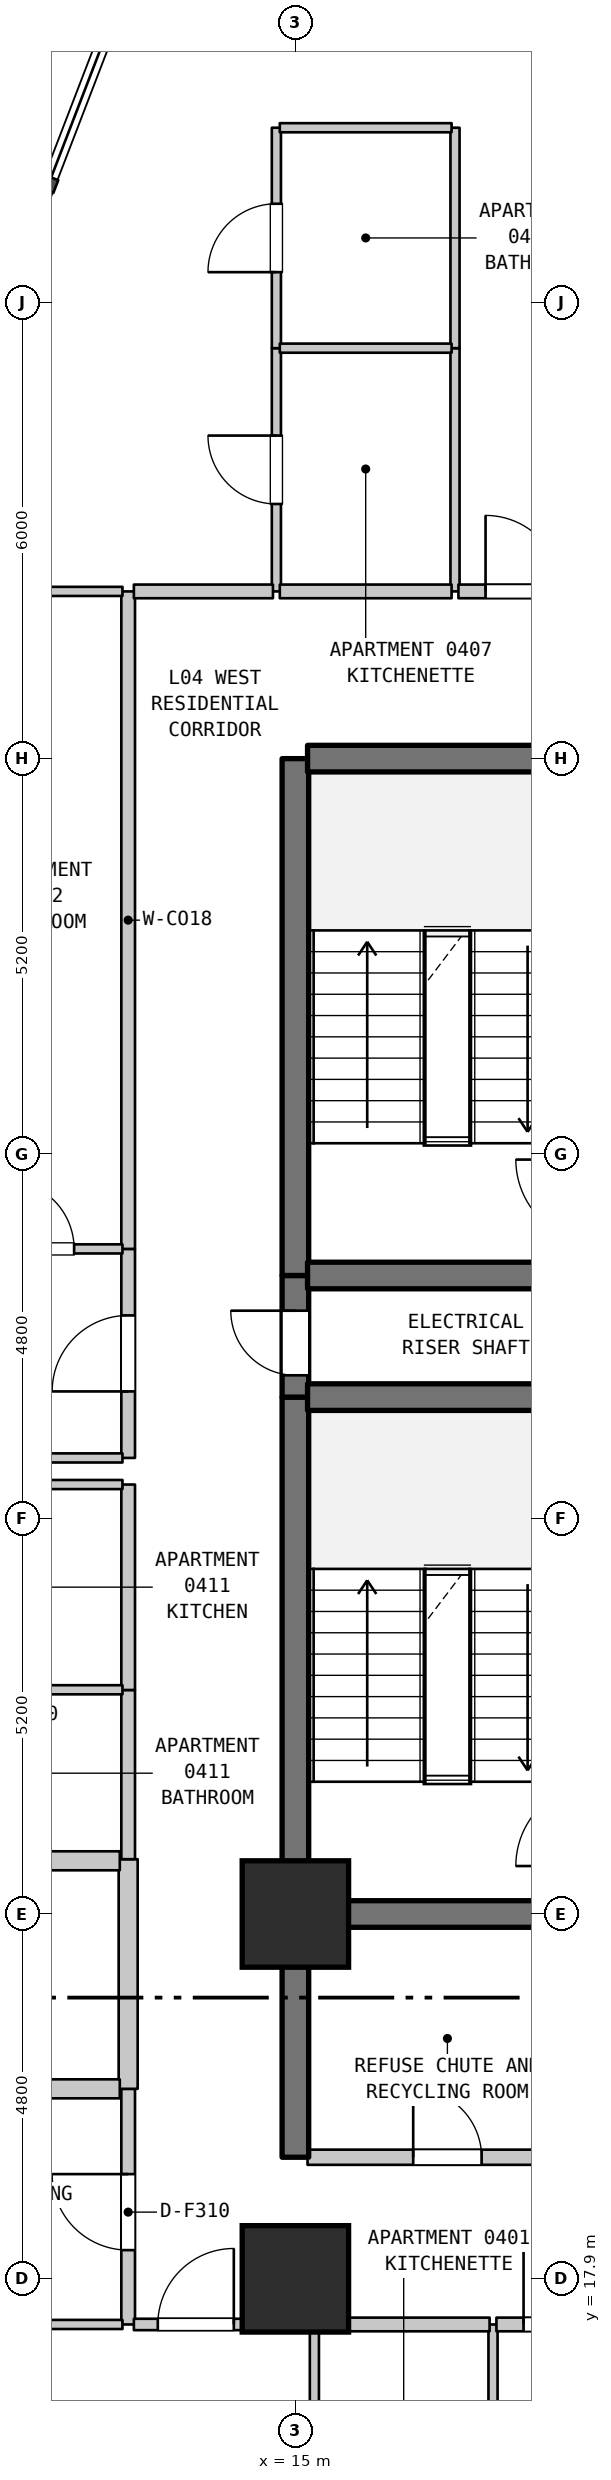
"""IFC4 building model, lengths in metres.
Left out: names, types, materials, properties, quantities, classifications, styles, units other than length and angle.
Written with IfcOpenShell. Run it as: python <this file> out.ifc"""

import sys

from ifc_helpers import new_model, si_unit, direction, frame, frame_2d, origin, origin_2d, place, context, subcontext, project, spatial, rectangle, extrude, element, fill, save


model = new_model("IFC4")
c1 = context("Model", 3, precision=1e-05, world=origin(), true_north=direction((0.0, 1.0)))
c2 = subcontext(c1, "Body", "Model", "MODEL_VIEW")
j1 = project(units=[si_unit("LENGTHUNIT", "METRE"), si_unit("PLANEANGLEUNIT", "RADIAN")], contexts=[c1])
p1 = place(None, origin())
s1 = spatial("IfcSite", under=j1, at=p1, CompositionType="ELEMENT")
p2 = place(p1, origin())
s2 = spatial("IfcBuilding", under=s1, at=p2, CompositionType="ELEMENT")
p3 = place(p2, frame((0.0, 0.0, 24.0)))
s3 = spatial("IfcBuildingStorey", under=s2, at=p3, CompositionType="ELEMENT", Elevation=24.0)
for number, where, z_axis, x_axis in (
    (1, (15.0, 17.9, 0.0), (0.0, 0.0, 1.0), (1.0, 0.0, 0.0)),
    (2, (15.0, 22.7, 0.0), (0.0, 0.0, 1.0), (1.0, 0.0, 0.0)),
):
    element("IfcColumn", number, at=place(p3, frame(where, z_axis=z_axis, x_axis=x_axis)), inside=s3, PredefinedType="COLUMN", context=c2, shape_type="SweptSolid", body=[
        extrude(rectangle(XDim=1.4, YDim=1.4, at=origin_2d()), origin(), (0.0, 0.0, 1.0), 3.7),
    ])
p4 = place(p3, frame((12.8, 17.3, 0.0), z_axis=(0.0, 0.0, 1.0), x_axis=(0.0, 1.0, 0.0)))
e3 = element("IfcWall", 3, at=p4, inside=s3, PredefinedType="STANDARD", context=c2, shape_type="SweptSolid", body=[
    extrude(rectangle(XDim=3.1, YDim=0.18, at=frame_2d((1.55, 0.0))), origin(), (0.0, 0.0, 1.0), 3.385),
])
p5 = place(p4, frame((0.978, 0.0, 0.0)))
e4 = element("IfcOpeningElement", 4, at=p5, cuts=e3, PredefinedType="OPENING", context=c2, shape_type="SweptSolid", body=[
    extrude(rectangle(XDim=1.0, YDim=2.15, at=frame_2d((0.5, 1.075))), frame((0.0, 0.1, 0.0), z_axis=(0.0, -1.0, 0.0), x_axis=(1.0, 0.0, 0.0)), (0.0, 0.0, 1.0), 0.2),
])
p6 = place(p3, frame((12.8, 20.4, 0.0), z_axis=(0.0, 0.0, 1.0), x_axis=(0.0, 1.0, 0.0)))
e5 = element("IfcWall", 5, at=p6, inside=s3, PredefinedType="STANDARD", context=c2, shape_type="SweptSolid", body=[
    extrude(rectangle(XDim=3.021, YDim=0.25, at=frame_2d((1.51, 0.0))), origin(), (0.0, 0.0, 1.0), 3.385),
])
p7 = place(p3, frame((12.8, 23.421, 0.0), z_axis=(0.0, 0.0, 1.0), x_axis=(0.0, 1.0, 0.0)))
e6 = element("IfcWall", 6, at=p7, inside=s3, PredefinedType="STANDARD", context=c2, shape_type="SweptSolid", body=[
    extrude(rectangle(XDim=2.226, YDim=0.18, at=frame_2d((1.113, 0.0))), origin(), (0.0, 0.0, 1.0), 3.385),
])
p8 = place(p3, frame((12.8, 25.647, 0.0), z_axis=(0.0, 0.0, 1.0), x_axis=(0.0, 1.0, 0.0)))
e7 = element("IfcWall", 7, at=p8, inside=s3, PredefinedType="STANDARD", context=c2, shape_type="SweptSolid", body=[
    extrude(rectangle(XDim=2.703, YDim=0.18, at=frame_2d((1.352, 0.0))), origin(), (0.0, 0.0, 1.0), 3.385),
])
p9 = place(p3, frame((12.8, 28.7, 0.0), z_axis=(0.0, 0.0, 1.0), x_axis=(0.0, 1.0, 0.0)))
e8 = element("IfcWall", 8, at=p9, inside=s3, PredefinedType="STANDARD", context=c2, shape_type="SweptSolid", body=[
    extrude(rectangle(XDim=2.75, YDim=0.18, at=frame_2d((1.375, 0.0))), origin(), (0.0, 0.0, 1.0), 3.385),
])
p10 = place(p9, frame((0.875, 0.0, 0.0)))
e9 = element("IfcOpeningElement", 9, at=p10, cuts=e8, PredefinedType="OPENING", context=c2, shape_type="SweptSolid", body=[
    extrude(rectangle(XDim=1.0, YDim=2.15, at=frame_2d((0.5, 1.075))), frame((0.0, 0.1, 0.0), z_axis=(0.0, -1.0, 0.0), x_axis=(1.0, 0.0, 0.0)), (0.0, 0.0, 1.0), 0.2),
])
p11 = place(p3, frame((12.8, 31.45, 0.0), z_axis=(0.0, 0.0, 1.0), x_axis=(0.0, 1.0, 0.0)))
e10 = element("IfcWall", 10, at=p11, inside=s3, PredefinedType="STANDARD", context=c2, shape_type="SweptSolid", body=[
    extrude(rectangle(XDim=8.65, YDim=0.18, at=frame_2d((4.325, 0.0))), origin(), (0.0, 0.0, 1.0), 3.385),
])
p12 = place(p3, frame((14.75, 40.1, 0.0), z_axis=(0.0, 0.0, 1.0), x_axis=(0.0, 1.0, 0.0)))
e11 = element("IfcWall", 11, at=p12, inside=s3, PredefinedType="PARTITIONING", context=c2, shape_type="SweptSolid", body=[
    extrude(rectangle(XDim=3.2, YDim=0.12, at=frame_2d((1.6, 0.0))), origin(), (0.0, 0.0, 1.0), 3.385),
])
p13 = place(p12, frame((1.15, 0.0, 0.0)))
e12 = element("IfcOpeningElement", 12, at=p13, cuts=e11, PredefinedType="OPENING", context=c2, shape_type="SweptSolid", body=[
    extrude(rectangle(XDim=0.9, YDim=2.15, at=frame_2d((0.45, 1.075))), frame((0.0, 0.07, 0.0), z_axis=(0.0, -1.0, 0.0), x_axis=(1.0, 0.0, 0.0)), (0.0, 0.0, 1.0), 0.14),
])
p14 = place(p3, frame((14.75, 43.3, 0.0), z_axis=(0.0, 0.0, 1.0), x_axis=(0.0, 1.0, 0.0)))
e13 = element("IfcWall", 13, at=p14, inside=s3, PredefinedType="PARTITIONING", context=c2, shape_type="SweptSolid", body=[
    extrude(rectangle(XDim=2.9, YDim=0.12, at=frame_2d((1.45, 0.0))), origin(), (0.0, 0.0, 1.0), 3.385),
])
p15 = place(p14, frame((1.0, 0.0, 0.0)))
e14 = element("IfcOpeningElement", 14, at=p15, cuts=e13, PredefinedType="OPENING", context=c2, shape_type="SweptSolid", body=[
    extrude(rectangle(XDim=0.9, YDim=2.1, at=frame_2d((0.45, 1.05))), frame((0.0, 0.07, 0.0), z_axis=(0.0, -1.0, 0.0), x_axis=(1.0, 0.0, 0.0)), (0.0, 0.0, 1.0), 0.14),
])
p16 = place(p3, frame((15.0, 19.5, 0.0), z_axis=(0.0, 0.0, 1.0), x_axis=(0.0, 1.0, 0.0)))
e15 = element("IfcWall", 15, at=p16, inside=s3, PredefinedType="SHEAR", context=c2, shape_type="SweptSolid", body=[
    extrude(rectangle(XDim=3.2, YDim=0.35, at=frame_2d((1.6, 0.0))), origin(), (0.0, 0.0, 1.0), 3.385),
])
p17 = place(p3, frame((15.0, 22.7, 0.0), z_axis=(0.0, 0.0, 1.0), x_axis=(0.0, 1.0, 0.0)))
e16 = element("IfcWall", 16, at=p17, inside=s3, PredefinedType="SHEAR", context=c2, shape_type="SweptSolid", body=[
    extrude(rectangle(XDim=6.8, YDim=0.35, at=frame_2d((3.4, 0.0))), origin(), (0.0, 0.0, 1.0), 3.385),
])
p18 = place(p3, frame((15.0, 29.5, 0.0), z_axis=(0.0, 0.0, 1.0), x_axis=(0.0, 1.0, 0.0)))
e17 = element("IfcWall", 17, at=p18, inside=s3, PredefinedType="SHEAR", context=c2, shape_type="SweptSolid", body=[
    extrude(rectangle(XDim=1.6, YDim=0.35, at=frame_2d((0.8, 0.0))), origin(), (0.0, 0.0, 1.0), 3.385),
])
p19 = place(p18, frame((0.287, 0.0, 0.0)))
e18 = element("IfcOpeningElement", 18, at=p19, cuts=e17, PredefinedType="OPENING", context=c2, shape_type="SweptSolid", body=[
    extrude(rectangle(XDim=0.85, YDim=2.1, at=frame_2d((0.425, 1.05))), frame((0.0, 0.185, 0.0), z_axis=(0.0, -1.0, 0.0), x_axis=(1.0, 0.0, 0.0)), (0.0, 0.0, 1.0), 0.37),
])
p20 = place(p3, frame((15.0, 31.1, 0.0), z_axis=(0.0, 0.0, 1.0), x_axis=(0.0, 1.0, 0.0)))
e19 = element("IfcWall", 19, at=p20, inside=s3, PredefinedType="SHEAR", context=c2, shape_type="SweptSolid", body=[
    extrude(rectangle(XDim=6.8, YDim=0.35, at=frame_2d((3.4, 0.0))), origin(), (0.0, 0.0, 1.0), 3.385),
])
for number, where, z_axis, x_axis in (
    (20, (15.25, 14.1, 0.0), (0.0, 0.0, 1.0), (0.0, 1.0, 0.0)),
    (21, (17.1, 40.1, 0.0), (0.0, 0.0, 1.0), (0.0, 1.0, 0.0)),
):
    element("IfcWall", number, at=place(p3, frame(where, z_axis=z_axis, x_axis=x_axis)), inside=s3, PredefinedType="PARTITIONING", context=c2, shape_type="SweptSolid", body=[
        extrude(rectangle(XDim=3.2, YDim=0.12, at=frame_2d((1.6, 0.0))), origin(), (0.0, 0.0, 1.0), 3.385),
    ])
p21 = place(p3, frame((17.1, 43.3, 0.0), z_axis=(0.0, 0.0, 1.0), x_axis=(0.0, 1.0, 0.0)))
e22 = element("IfcWall", 22, at=p21, inside=s3, PredefinedType="PARTITIONING", context=c2, shape_type="SweptSolid", body=[
    extrude(rectangle(XDim=2.9, YDim=0.12, at=frame_2d((1.45, 0.0))), origin(), (0.0, 0.0, 1.0), 3.385),
])
p22 = place(p3, frame((17.6, 14.1, 0.0), z_axis=(0.0, 0.0, 1.0), x_axis=(0.0, 1.0, 0.0)))
e23 = element("IfcWall", 23, at=p22, inside=s3, PredefinedType="PARTITIONING", context=c2, shape_type="SweptSolid", body=[
    extrude(rectangle(XDim=3.2, YDim=0.12, at=frame_2d((1.6, 0.0))), origin(), (0.0, 0.0, 1.0), 3.385),
])
p23 = place(p22, frame((1.15, 0.0, 0.0)))
e24 = element("IfcOpeningElement", 24, at=p23, cuts=e23, PredefinedType="OPENING", context=c2, shape_type="SweptSolid", body=[
    extrude(rectangle(XDim=0.9, YDim=2.15, at=frame_2d((0.45, 1.075))), frame((0.0, 0.07, 0.0), z_axis=(0.0, -1.0, 0.0), x_axis=(1.0, 0.0, 0.0)), (0.0, 0.0, 1.0), 0.14),
])
p24 = place(p3, frame((9.085, 17.3, 0.0), z_axis=(0.0, 0.0, 1.0), x_axis=(1.0, 0.0, 0.0)))
e25 = element("IfcWall", 25, at=p24, inside=s3, PredefinedType="PARTITIONING", context=c2, shape_type="SweptSolid", body=[
    extrude(rectangle(XDim=3.64, YDim=0.12, at=frame_2d((1.82, 0.0))), origin(), (0.0, 0.0, 1.0), 3.385),
])
p25 = place(p3, frame((12.875, 17.3, 0.0), z_axis=(0.0, 0.0, 1.0), x_axis=(1.0, 0.0, 0.0)))
e26 = element("IfcWall", 26, at=p25, inside=s3, PredefinedType="STANDARD", context=c2, shape_type="SweptSolid", body=[
    extrude(rectangle(XDim=2.33, YDim=0.15, at=frame_2d((1.165, 0.0))), origin(), (0.0, 0.0, 1.0), 3.385),
])
p26 = place(p25, frame((0.315, 0.0, 0.0)))
e27 = element("IfcOpeningElement", 27, at=p26, cuts=e26, PredefinedType="OPENING", context=c2, shape_type="SweptSolid", body=[
    extrude(rectangle(XDim=1.0, YDim=2.15, at=frame_2d((0.5, 1.075))), frame((0.0, 0.085, 0.0), z_axis=(0.0, -1.0, 0.0), x_axis=(1.0, 0.0, 0.0)), (0.0, 0.0, 1.0), 0.17),
])
p27 = place(p3, frame((15.295, 17.3, 0.0), z_axis=(0.0, 0.0, 1.0), x_axis=(1.0, 0.0, 0.0)))
e28 = element("IfcWall", 28, at=p27, inside=s3, PredefinedType="STANDARD", context=c2, shape_type="SweptSolid", body=[
    extrude(rectangle(XDim=2.26, YDim=0.18, at=frame_2d((1.13, 0.0))), origin(), (0.0, 0.0, 1.0), 3.385),
])
p28 = place(p3, frame((17.645, 17.3, 0.0), z_axis=(0.0, 0.0, 1.0), x_axis=(1.0, 0.0, 0.0)))
e29 = element("IfcWall", 29, at=p28, inside=s3, PredefinedType="STANDARD", context=c2, shape_type="SweptSolid", body=[
    extrude(rectangle(XDim=1.86, YDim=0.18, at=frame_2d((0.93, 0.0))), origin(), (0.0, 0.0, 1.0), 3.385),
])
p29 = place(p28, frame((0.357, 0.0, 0.0)))
e30 = element("IfcOpeningElement", 30, at=p29, cuts=e29, PredefinedType="OPENING", context=c2, shape_type="SweptSolid", body=[
    extrude(rectangle(XDim=1.0, YDim=2.15, at=frame_2d((0.5, 1.075))), frame((0.0, 0.1, 0.0), z_axis=(0.0, -1.0, 0.0), x_axis=(1.0, 0.0, 0.0)), (0.0, 0.0, 1.0), 0.2),
])
p30 = place(p3, frame((15.16, 19.5, 0.0), z_axis=(0.0, 0.0, 1.0), x_axis=(1.0, 0.0, 0.0)))
e31 = element("IfcWall", 31, at=p30, inside=s3, PredefinedType="STANDARD", context=c2, shape_type="SweptSolid", body=[
    extrude(rectangle(XDim=3.68, YDim=0.2, at=frame_2d((1.84, 0.0))), origin(), (0.0, 0.0, 1.0), 3.385),
])
p31 = place(p30, frame((1.39, 0.0, 0.0)))
e32 = element("IfcOpeningElement", 32, at=p31, cuts=e31, PredefinedType="OPENING", context=c2, shape_type="SweptSolid", body=[
    extrude(rectangle(XDim=0.9, YDim=2.15, at=frame_2d((0.45, 1.075))), frame((0.0, 0.11, 0.0), z_axis=(0.0, -1.0, 0.0), x_axis=(1.0, 0.0, 0.0)), (0.0, 0.0, 1.0), 0.22),
])
p32 = place(p3, frame((10.66, 20.4, 0.0), z_axis=(0.0, 0.0, 1.0), x_axis=(1.0, 0.0, 0.0)))
e33 = element("IfcWall", 33, at=p32, inside=s3, PredefinedType="STANDARD", context=c2, shape_type="SweptSolid", body=[
    extrude(rectangle(XDim=2.03, YDim=0.25, at=frame_2d((1.015, 0.0))), origin(), (0.0, 0.0, 1.0), 3.385),
])
p33 = place(p3, frame((15.16, 22.7, 0.0), z_axis=(0.0, 0.0, 1.0), x_axis=(1.0, 0.0, 0.0)))
e34 = element("IfcWall", 34, at=p33, inside=s3, PredefinedType="SHEAR", context=c2, shape_type="SweptSolid", body=[
    extrude(rectangle(XDim=3.68, YDim=0.35, at=frame_2d((1.84, 0.0))), origin(), (0.0, 0.0, 1.0), 3.385),
])
p34 = place(p3, frame((10.66, 23.4, 0.0), z_axis=(0.0, 0.0, 1.0), x_axis=(1.0, 0.0, 0.0)))
e35 = element("IfcWall", 35, at=p34, inside=s3, PredefinedType="STANDARD", context=c2, shape_type="SweptSolid", body=[
    extrude(rectangle(XDim=2.03, YDim=0.25, at=frame_2d((1.015, 0.0))), origin(), (0.0, 0.0, 1.0), 3.385),
])
for number, where, z_axis, x_axis in (
    (36, (10.595, 25.65, 0.0), (0.0, 0.0, 1.0), (1.0, 0.0, 0.0)),
    (37, (10.595, 28.35, 0.0), (0.0, 0.0, 1.0), (1.0, 0.0, 0.0)),
):
    element("IfcWall", number, at=place(p3, frame(where, z_axis=z_axis, x_axis=x_axis)), inside=s3, PredefinedType="PARTITIONING", context=c2, shape_type="SweptSolid", body=[
        extrude(rectangle(XDim=2.13, YDim=0.12, at=frame_2d((1.065, 0.0))), origin(), (0.0, 0.0, 1.0), 3.385),
    ])
p35 = place(p3, frame((9.03, 28.7, 0.0), z_axis=(0.0, 0.0, 1.0), x_axis=(1.0, 0.0, 0.0)))
e38 = element("IfcWall", 38, at=p35, inside=s3, PredefinedType="PARTITIONING", context=c2, shape_type="SweptSolid", body=[
    extrude(rectangle(XDim=3.695, YDim=0.12, at=frame_2d((1.848, 0.0))), origin(), (0.0, 0.0, 1.0), 3.385),
])
for number, where, z_axis, x_axis in (
    (39, (15.16, 29.5, 0.0), (0.0, 0.0, 1.0), (1.0, 0.0, 0.0)),
    (40, (15.16, 31.1, 0.0), (0.0, 0.0, 1.0), (1.0, 0.0, 0.0)),
):
    element("IfcWall", number, at=place(p3, frame(where, z_axis=z_axis, x_axis=x_axis)), inside=s3, PredefinedType="SHEAR", context=c2, shape_type="SweptSolid", body=[
        extrude(rectangle(XDim=3.68, YDim=0.35, at=frame_2d((1.84, 0.0))), origin(), (0.0, 0.0, 1.0), 3.385),
    ])
p36 = place(p3, frame((10.523, 31.45, 0.0), z_axis=(0.0, 0.0, 1.0), x_axis=(1.0, 0.0, 0.0)))
e41 = element("IfcWall", 41, at=p36, inside=s3, PredefinedType="PARTITIONING", context=c2, shape_type="SweptSolid", body=[
    extrude(rectangle(XDim=2.202, YDim=0.12, at=frame_2d((1.101, 0.0))), origin(), (0.0, 0.0, 1.0), 3.385),
])
p37 = place(p36, frame((0.666, 0.0, 0.0)))
e42 = element("IfcOpeningElement", 42, at=p37, cuts=e41, PredefinedType="OPENING", context=c2, shape_type="SweptSolid", body=[
    extrude(rectangle(XDim=0.9, YDim=2.1, at=frame_2d((0.45, 1.05))), frame((0.0, 0.07, 0.0), z_axis=(0.0, -1.0, 0.0), x_axis=(1.0, 0.0, 0.0)), (0.0, 0.0, 1.0), 0.14),
])
p38 = place(p3, frame((15.16, 37.9, 0.0), z_axis=(0.0, 0.0, 1.0), x_axis=(1.0, 0.0, 0.0)))
e43 = element("IfcWall", 43, at=p38, inside=s3, PredefinedType="SHEAR", context=c2, shape_type="SweptSolid", body=[
    extrude(rectangle(XDim=3.68, YDim=0.35, at=frame_2d((1.84, 0.0))), origin(), (0.0, 0.0, 1.0), 3.385),
])
p39 = place(p3, frame((10.523, 40.1, 0.0), z_axis=(0.0, 0.0, 1.0), x_axis=(1.0, 0.0, 0.0)))
e44 = element("IfcWall", 44, at=p39, inside=s3, PredefinedType="PARTITIONING", context=c2, shape_type="SweptSolid", body=[
    extrude(rectangle(XDim=2.202, YDim=0.12, at=frame_2d((1.101, 0.0))), origin(), (0.0, 0.0, 1.0), 3.385),
])
p40 = place(p3, frame((12.875, 40.1, 0.0), z_axis=(0.0, 0.0, 1.0), x_axis=(1.0, 0.0, 0.0)))
e45 = element("IfcWall", 45, at=p40, inside=s3, PredefinedType="STANDARD", context=c2, shape_type="SweptSolid", body=[
    extrude(rectangle(XDim=1.83, YDim=0.18, at=frame_2d((0.915, 0.0))), origin(), (0.0, 0.0, 1.0), 3.385),
])
p41 = place(p3, frame((14.795, 40.1, 0.0), z_axis=(0.0, 0.0, 1.0), x_axis=(1.0, 0.0, 0.0)))
e46 = element("IfcWall", 46, at=p41, inside=s3, PredefinedType="STANDARD", context=c2, shape_type="SweptSolid", body=[
    extrude(rectangle(XDim=2.26, YDim=0.18, at=frame_2d((1.13, 0.0))), origin(), (0.0, 0.0, 1.0), 3.385),
])
p42 = place(p3, frame((17.145, 40.1, 0.0), z_axis=(0.0, 0.0, 1.0), x_axis=(1.0, 0.0, 0.0)))
e47 = element("IfcWall", 47, at=p42, inside=s3, PredefinedType="STANDARD", context=c2, shape_type="SweptSolid", body=[
    extrude(rectangle(XDim=1.86, YDim=0.18, at=frame_2d((0.93, 0.0))), origin(), (0.0, 0.0, 1.0), 3.385),
])
p43 = place(p42, frame((0.357, 0.0, 0.0)))
e48 = element("IfcOpeningElement", 48, at=p43, cuts=e47, PredefinedType="OPENING", context=c2, shape_type="SweptSolid", body=[
    extrude(rectangle(XDim=1.0, YDim=2.15, at=frame_2d((0.5, 1.075))), frame((0.0, 0.1, 0.0), z_axis=(0.0, -1.0, 0.0), x_axis=(1.0, 0.0, 0.0)), (0.0, 0.0, 1.0), 0.2),
])
for number, where, z_axis, x_axis in (
    (49, (14.795, 43.3, 0.0), (0.0, 0.0, 1.0), (1.0, 0.0, 0.0)),
    (50, (14.795, 46.2, 0.0), (0.0, 0.0, 1.0), (1.0, 0.0, 0.0)),
):
    element("IfcWall", number, at=place(p3, frame(where, z_axis=z_axis, x_axis=x_axis)), inside=s3, PredefinedType="PARTITIONING", context=c2, shape_type="SweptSolid", body=[
        extrude(rectangle(XDim=2.26, YDim=0.12, at=frame_2d((1.13, 0.0))), origin(), (0.0, 0.0, 1.0), 3.385),
    ])
p44 = place(p5, origin())
e51 = element("IfcDoor", 51, at=p44, inside=s3, OperationType="SINGLE_SWING_RIGHT", PredefinedType="DOOR", context=c2, shape_type="SweptSolid", body=[
    extrude(rectangle(XDim=1.0, YDim=2.15, at=frame_2d((0.5, 1.075))), frame((0.0, 0.025, 0.0), z_axis=(0.0, -1.0, 0.0), x_axis=(1.0, 0.0, 0.0)), (0.0, 0.0, 1.0), 0.05),
])
fill(e4, e51)
p45 = place(p10, origin())
e52 = element("IfcDoor", 52, at=p45, inside=s3, OperationType="SINGLE_SWING_LEFT", PredefinedType="DOOR", context=c2, shape_type="SweptSolid", body=[
    extrude(rectangle(XDim=1.0, YDim=2.15, at=frame_2d((0.5, 1.075))), frame((0.0, 0.025, 0.0), z_axis=(0.0, -1.0, 0.0), x_axis=(1.0, 0.0, 0.0)), (0.0, 0.0, 1.0), 0.05),
])
fill(e9, e52)
p46 = place(p13, origin())
e53 = element("IfcDoor", 53, at=p46, inside=s3, OperationType="SINGLE_SWING_RIGHT", PredefinedType="DOOR", context=c2, shape_type="SweptSolid", body=[
    extrude(rectangle(XDim=0.9, YDim=2.15, at=frame_2d((0.45, 1.075))), frame((0.0, 0.025, 0.0), z_axis=(0.0, -1.0, 0.0), x_axis=(1.0, 0.0, 0.0)), (0.0, 0.0, 1.0), 0.05),
])
fill(e12, e53)
p47 = place(p15, origin())
e54 = element("IfcDoor", 54, at=p47, inside=s3, OperationType="SINGLE_SWING_LEFT", PredefinedType="DOOR", context=c2, shape_type="SweptSolid", body=[
    extrude(rectangle(XDim=0.9, YDim=2.1, at=frame_2d((0.45, 1.05))), frame((0.0, 0.025, 0.0), z_axis=(0.0, -1.0, 0.0), x_axis=(1.0, 0.0, 0.0)), (0.0, 0.0, 1.0), 0.05),
])
fill(e14, e54)
p48 = place(p19, origin())
e55 = element("IfcDoor", 55, at=p48, inside=s3, OperationType="SINGLE_SWING_RIGHT", PredefinedType="DOOR", context=c2, shape_type="SweptSolid", body=[
    extrude(rectangle(XDim=0.85, YDim=2.1, at=frame_2d((0.425, 1.05))), frame((0.0, 0.025, 0.0), z_axis=(0.0, -1.0, 0.0), x_axis=(1.0, 0.0, 0.0)), (0.0, 0.0, 1.0), 0.05),
])
fill(e18, e55)
p49 = place(p26, origin())
e56 = element("IfcDoor", 56, at=p49, inside=s3, OperationType="SINGLE_SWING_RIGHT", PredefinedType="DOOR", context=c2, shape_type="SweptSolid", body=[
    extrude(rectangle(XDim=1.0, YDim=2.15, at=frame_2d((0.5, 1.075))), frame((0.0, 0.025, 0.0), z_axis=(0.0, -1.0, 0.0), x_axis=(1.0, 0.0, 0.0)), (0.0, 0.0, 1.0), 0.05),
])
fill(e27, e56)
p50 = place(p29, origin())
e57 = element("IfcDoor", 57, at=p50, inside=s3, OperationType="SINGLE_SWING_LEFT", PredefinedType="DOOR", context=c2, shape_type="SweptSolid", body=[
    extrude(rectangle(XDim=1.0, YDim=2.15, at=frame_2d((0.5, 1.075))), frame((0.0, 0.025, 0.0), z_axis=(0.0, -1.0, 0.0), x_axis=(1.0, 0.0, 0.0)), (0.0, 0.0, 1.0), 0.05),
])
fill(e30, e57)
p51 = place(p31, origin())
e58 = element("IfcDoor", 58, at=p51, inside=s3, OperationType="SINGLE_SWING_LEFT", PredefinedType="DOOR", context=c2, shape_type="SweptSolid", body=[
    extrude(rectangle(XDim=0.9, YDim=2.15, at=frame_2d((0.45, 1.075))), frame((0.0, 0.025, 0.0), z_axis=(0.0, -1.0, 0.0), x_axis=(1.0, 0.0, 0.0)), (0.0, 0.0, 1.0), 0.05),
])
fill(e32, e58)
p52 = place(p37, origin())
e59 = element("IfcDoor", 59, at=p52, inside=s3, OperationType="SINGLE_SWING_LEFT", PredefinedType="DOOR", context=c2, shape_type="SweptSolid", body=[
    extrude(rectangle(XDim=0.9, YDim=2.1, at=frame_2d((0.45, 1.05))), frame((0.0, 0.025, 0.0), z_axis=(0.0, -1.0, 0.0), x_axis=(1.0, 0.0, 0.0)), (0.0, 0.0, 1.0), 0.05),
])
fill(e42, e59)
p53 = place(p43, origin())
e60 = element("IfcDoor", 60, at=p53, inside=s3, OperationType="SINGLE_SWING_LEFT", PredefinedType="DOOR", context=c2, shape_type="SweptSolid", body=[
    extrude(rectangle(XDim=1.0, YDim=2.15, at=frame_2d((0.5, 1.075))), frame((0.0, 0.025, 0.0), z_axis=(0.0, -1.0, 0.0), x_axis=(1.0, 0.0, 0.0)), (0.0, 0.0, 1.0), 0.05),
])
fill(e48, e60)
save(model, sys.argv[1])
